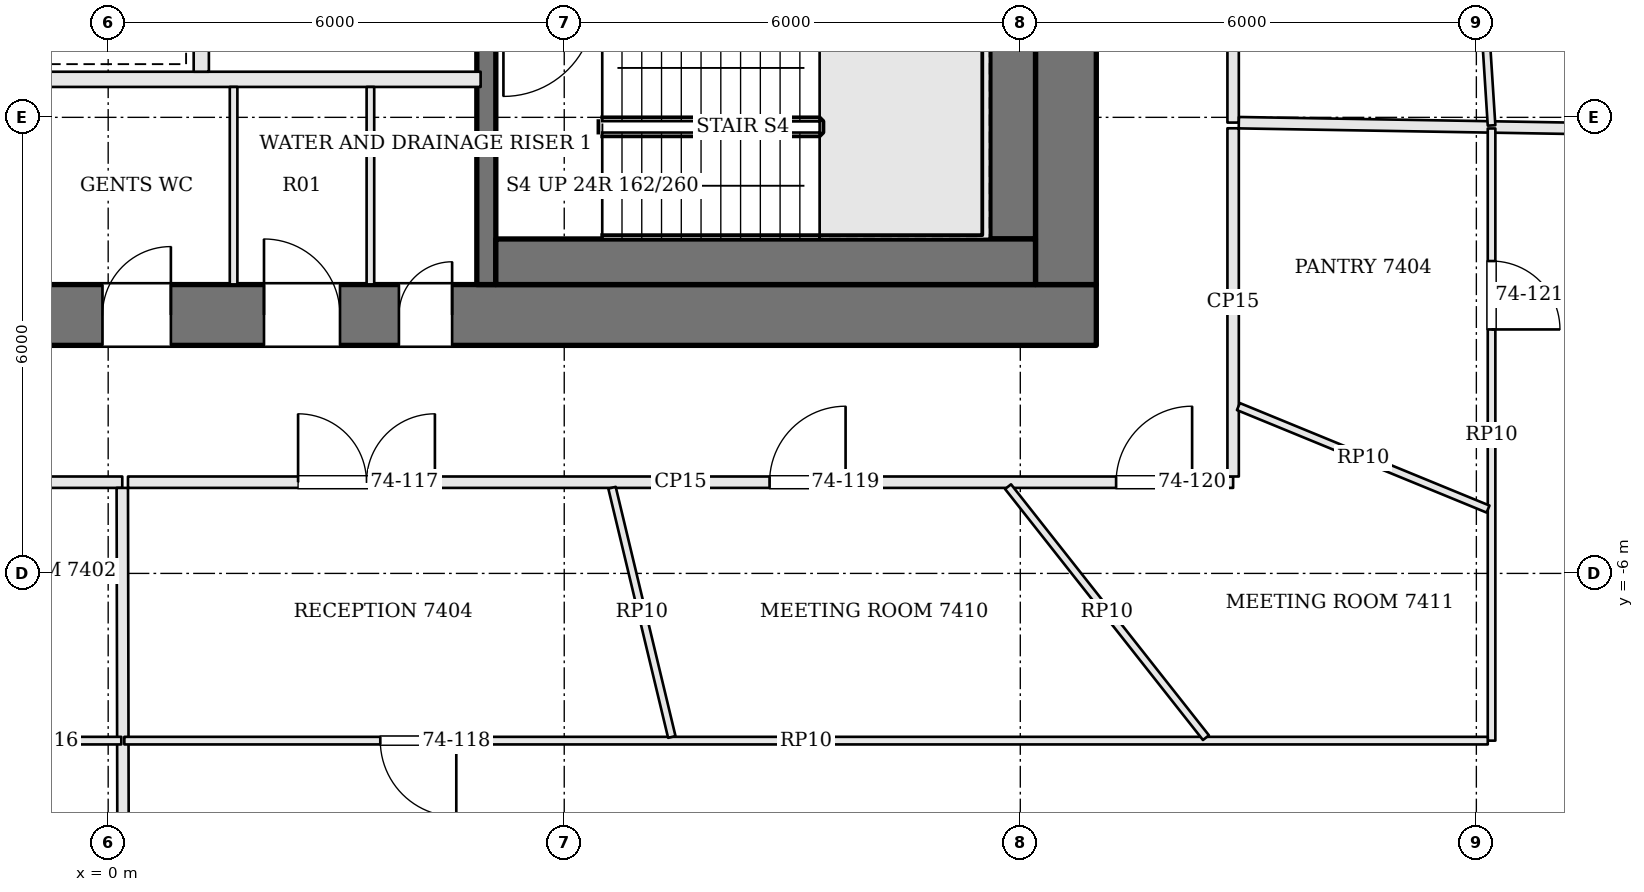
"""IFC4 building model, lengths in metres.
Left out: names, types, materials, properties, quantities, classifications, styles, units other than length and angle.
Written with IfcOpenShell. Run it as: python <this file> out.ifc"""

import sys

from ifc_helpers import new_model, si_unit, direction, frame, frame_2d, origin, place, context, subcontext, project, spatial, rectangle, extrude, element, fill, save


model = new_model("IFC4")
c1 = context("Model", 3, precision=1e-05, world=origin(), true_north=direction((0.0, 1.0)))
c2 = subcontext(c1, "Body", "Model", "MODEL_VIEW")
j1 = project(units=[si_unit("LENGTHUNIT", "METRE"), si_unit("PLANEANGLEUNIT", "RADIAN")], contexts=[c1])
p1 = place(None, origin())
s1 = spatial("IfcSite", under=j1, at=p1, CompositionType="ELEMENT")
p2 = place(p1, origin())
s2 = spatial("IfcBuilding", under=s1, at=p2, CompositionType="ELEMENT")
p3 = place(p2, frame((0.0, 0.0, 300.0)))
s3 = spatial("IfcBuildingStorey", under=s2, at=p3, CompositionType="ELEMENT", Elevation=300.0)
p4 = place(p3, frame((-13.0, -2.6, 0.0), z_axis=(0.0, 0.0, 1.0), x_axis=(1.0, 0.0, 0.0)))
e1 = element("IfcWall", 1, at=p4, inside=s3, PredefinedType="SHEAR", context=c2, shape_type="SweptSolid", body=[
    extrude(rectangle(XDim=26.0, YDim=0.8, at=frame_2d((13.0, 0.0))), origin(), (0.0, 0.0, 1.0), 3.9),
])
p5 = place(p4, frame((9.65, 0.0, 0.0)))
e2 = element("IfcOpeningElement", 2, at=p5, cuts=e1, PredefinedType="OPENING", context=c2, shape_type="SweptSolid", body=[
    extrude(rectangle(XDim=0.9, YDim=2.1, at=frame_2d((0.45, 1.05))), frame((0.0, 0.41, 0.0), z_axis=(0.0, -1.0, 0.0), x_axis=(1.0, 0.0, 0.0)), (0.0, 0.0, 1.0), 0.82),
])
p6 = place(p4, frame((12.925, 0.0, 0.0)))
e3 = element("IfcOpeningElement", 3, at=p6, cuts=e1, PredefinedType="OPENING", context=c2, shape_type="SweptSolid", body=[
    extrude(rectangle(XDim=0.9, YDim=2.1, at=frame_2d((0.45, 1.05))), frame((0.0, 0.41, 0.0), z_axis=(0.0, -1.0, 0.0), x_axis=(1.0, 0.0, 0.0)), (0.0, 0.0, 1.0), 0.82),
])
p7 = place(p4, frame((15.05, 0.0, 0.0)))
e4 = element("IfcOpeningElement", 4, at=p7, cuts=e1, PredefinedType="OPENING", context=c2, shape_type="SweptSolid", body=[
    extrude(rectangle(XDim=1.0, YDim=2.1, at=frame_2d((0.5, 1.05))), frame((0.0, 0.41, 0.0), z_axis=(0.0, -1.0, 0.0), x_axis=(1.0, 0.0, 0.0)), (0.0, 0.0, 1.0), 0.82),
])
p8 = place(p4, frame((16.825, 0.0, 0.0)))
e5 = element("IfcOpeningElement", 5, at=p8, cuts=e1, PredefinedType="OPENING", context=c2, shape_type="SweptSolid", body=[
    extrude(rectangle(XDim=0.7, YDim=2.1, at=frame_2d((0.35, 1.05))), frame((0.0, 0.41, 0.0), z_axis=(0.0, -1.0, 0.0), x_axis=(1.0, 0.0, 0.0)), (0.0, 0.0, 1.0), 0.82),
])
p9 = place(p3, frame((12.6, -2.2, 0.0), z_axis=(0.0, 0.0, 1.0), x_axis=(0.0, 1.0, 0.0)))
e6 = element("IfcWall", 6, at=p9, inside=s3, PredefinedType="SHEAR", context=c2, shape_type="SweptSolid", body=[
    extrude(rectangle(XDim=13.4, YDim=0.8, at=frame_2d((6.7, 0.0))), origin(), (0.0, 0.0, 1.0), 3.9),
])
p10 = place(p9, frame((7.4, 0.0, 0.0)))
e7 = element("IfcOpeningElement", 7, at=p10, cuts=e6, PredefinedType="OPENING", context=c2, shape_type="SweptSolid", body=[
    extrude(rectangle(XDim=1.8, YDim=2.1, at=frame_2d((0.9, 1.05))), frame((0.0, 0.41, 0.0), z_axis=(0.0, -1.0, 0.0), x_axis=(1.0, 0.0, 0.0)), (0.0, 0.0, 1.0), 0.82),
])
p11 = place(p3, frame((4.975, 11.2, 0.0), z_axis=(0.0, 0.0, 1.0), x_axis=(0.0, -1.0, 0.0)))
e8 = element("IfcWall", 8, at=p11, inside=s3, PredefinedType="SOLIDWALL", context=c2, shape_type="SweptSolid", body=[
    extrude(rectangle(XDim=13.4, YDim=0.25, at=frame_2d((6.7, 0.0))), origin(), (0.0, 0.0, 1.0), 3.7),
])
p12 = place(p11, frame((5.25, 0.0, 0.0)))
e9 = element("IfcOpeningElement", 9, at=p12, cuts=e8, PredefinedType="OPENING", context=c2, shape_type="SweptSolid", body=[
    extrude(rectangle(XDim=1.2, YDim=2.1, at=frame_2d((0.6, 1.05))), frame((0.0, 0.135, 0.0), z_axis=(0.0, -1.0, 0.0), x_axis=(1.0, 0.0, 0.0)), (0.0, 0.0, 1.0), 0.27),
])
p13 = place(p3, frame((11.9, 1.35, 0.0), z_axis=(0.0, 0.0, 1.0), x_axis=(0.0, -1.0, 0.0)))
e10 = element("IfcWall", 10, at=p13, inside=s3, PredefinedType="SOLIDWALL", context=c2, shape_type="SweptSolid", body=[
    extrude(rectangle(XDim=2.95, YDim=0.6, at=frame_2d((1.475, 0.0))), origin(), (0.0, 0.0, 1.0), 3.7),
])
p14 = place(p3, frame((12.2, -1.9, 0.0), z_axis=(0.0, 0.0, 1.0), x_axis=(-1.0, 0.0, 0.0)))
e11 = element("IfcWall", 11, at=p14, inside=s3, PredefinedType="SOLIDWALL", context=c2, shape_type="SweptSolid", body=[
    extrude(rectangle(XDim=7.1, YDim=0.6, at=frame_2d((3.55, 0.0))), origin(), (0.0, 0.0, 1.0), 3.7),
])
p15 = place(p3, frame((-4.9, 0.5, 0.0), z_axis=(0.0, 0.0, 1.0), x_axis=(1.0, 0.0, 0.0)))
e12 = element("IfcWall", 12, at=p15, inside=s3, PredefinedType="SOLIDWALL", context=c2, shape_type="SweptSolid", body=[
    extrude(rectangle(XDim=9.8, YDim=0.2, at=frame_2d((4.9, 0.0))), origin(), (0.0, 0.0, 1.0), 3.7),
])
p16 = place(p3, frame((1.225, 0.6, 0.0), z_axis=(0.0, 0.0, 1.0), x_axis=(0.0, 1.0, 0.0)))
e13 = element("IfcWall", 13, at=p16, inside=s3, PredefinedType="SOLIDWALL", context=c2, shape_type="SweptSolid", body=[
    extrude(rectangle(XDim=2.2, YDim=0.2, at=frame_2d((1.1, 0.0))), origin(), (0.0, 0.0, 1.0), 3.7),
])
for number, where, z_axis, x_axis in (
    (14, (1.65, -2.2, 0.0), (0.0, 0.0, 1.0), (0.0, 1.0, 0.0)),
    (15, (3.45, -2.2, 0.0), (0.0, 0.0, 1.0), (0.0, 1.0, 0.0)),
):
    element("IfcWall", number, at=place(p3, frame(where, z_axis=z_axis, x_axis=x_axis)), inside=s3, PredefinedType="PARTITIONING", context=c2, shape_type="SweptSolid", body=[
        extrude(rectangle(XDim=2.6, YDim=0.1, at=frame_2d((1.3, 0.0))), origin(), (0.0, 0.0, 1.0), 3.7),
    ])
p17 = place(p3, frame((14.8, -0.069, 0.0), z_axis=(0.0, 0.0, 1.0), x_axis=(0.0, 1.0, 0.0)))
e16 = element("IfcWall", 16, at=p17, inside=s3, PredefinedType="PARTITIONING", context=c2, shape_type="SweptSolid", body=[
    extrude(rectangle(XDim=13.869, YDim=0.15, at=frame_2d((6.935, 0.0))), origin(), (0.0, 0.0, 1.0), 3.198),
])
p18 = place(p17, frame((1.896, 0.0, 0.0)))
e17 = element("IfcOpeningElement", 17, at=p18, cuts=e16, PredefinedType="OPENING", context=c2, shape_type="SweptSolid", body=[
    extrude(rectangle(XDim=1.8, YDim=2.1, at=frame_2d((0.9, 1.05))), frame((0.0, 0.085, 0.0), z_axis=(0.0, -1.0, 0.0), x_axis=(1.0, 0.0, 0.0)), (0.0, 0.0, 1.0), 0.17),
])
p19 = place(p17, frame((6.355, 0.0, 0.0)))
e18 = element("IfcOpeningElement", 18, at=p19, cuts=e16, PredefinedType="OPENING", context=c2, shape_type="SweptSolid", body=[
    extrude(rectangle(XDim=1.0, YDim=2.4, at=frame_2d((0.5, 1.2))), frame((0.0, 0.085, 0.0), z_axis=(0.0, -1.0, 0.0), x_axis=(1.0, 0.0, 0.0)), (0.0, 0.0, 1.0), 0.17),
])
p20 = place(p17, frame((10.267, 0.0, 0.0)))
e19 = element("IfcOpeningElement", 19, at=p20, cuts=e16, PredefinedType="OPENING", context=c2, shape_type="SweptSolid", body=[
    extrude(rectangle(XDim=1.0, YDim=2.4, at=frame_2d((0.5, 1.2))), frame((0.0, 0.085, 0.0), z_axis=(0.0, -1.0, 0.0), x_axis=(1.0, 0.0, 0.0)), (0.0, 0.0, 1.0), 0.17),
])
p21 = place(p3, frame((24.384, -0.231, 0.0), z_axis=(0.0, 0.0, 1.0), x_axis=(-0.999857754758, 0.016866245889, 0.0)))
e20 = element("IfcWall", 20, at=p21, inside=s3, PredefinedType="PARTITIONING", context=c2, shape_type="SweptSolid", body=[
    extrude(rectangle(XDim=9.51, YDim=0.15, at=frame_2d((4.755, 0.0))), origin(), (0.0, 0.0, 1.0), 3.234),
])
p22 = place(p3, frame((-14.725, -4.8, 0.0), z_axis=(0.0, 0.0, 1.0), x_axis=(1.0, 0.0, 0.0)))
e21 = element("IfcWall", 21, at=p22, inside=s3, PredefinedType="PARTITIONING", context=c2, shape_type="SweptSolid", body=[
    extrude(rectangle(XDim=14.911, YDim=0.15, at=frame_2d((7.455, 0.0))), origin(), (0.0, 0.0, 1.0), 3.198),
])
p23 = place(p22, frame((0.525, 0.0, 0.0)))
e22 = element("IfcOpeningElement", 22, at=p23, cuts=e21, PredefinedType="OPENING", context=c2, shape_type="SweptSolid", body=[
    extrude(rectangle(XDim=1.0, YDim=2.4, at=frame_2d((0.5, 1.2))), frame((0.0, 0.085, 0.0), z_axis=(0.0, -1.0, 0.0), x_axis=(1.0, 0.0, 0.0)), (0.0, 0.0, 1.0), 0.17),
])
p24 = place(p22, frame((4.179, 0.0, 0.0)))
e23 = element("IfcOpeningElement", 23, at=p24, cuts=e21, PredefinedType="OPENING", context=c2, shape_type="SweptSolid", body=[
    extrude(rectangle(XDim=1.0, YDim=2.4, at=frame_2d((0.5, 1.2))), frame((0.0, 0.085, 0.0), z_axis=(0.0, -1.0, 0.0), x_axis=(1.0, 0.0, 0.0)), (0.0, 0.0, 1.0), 0.17),
])
p25 = place(p22, frame((6.794, 0.0, 0.0)))
e24 = element("IfcOpeningElement", 24, at=p25, cuts=e21, PredefinedType="OPENING", context=c2, shape_type="SweptSolid", body=[
    extrude(rectangle(XDim=0.7, YDim=2.1, at=frame_2d((0.35, 1.05))), frame((0.0, 0.085, 0.0), z_axis=(0.0, -1.0, 0.0), x_axis=(1.0, 0.0, 0.0)), (0.0, 0.0, 1.0), 0.17),
])
p26 = place(p3, frame((0.213, -17.994, 0.0), z_axis=(0.0, 0.0, 1.0), x_axis=(-0.002102907791, 0.999997788887, 0.0)))
e25 = element("IfcWall", 25, at=p26, inside=s3, PredefinedType="PARTITIONING", context=c2, shape_type="SweptSolid", body=[
    extrude(rectangle(XDim=13.119, YDim=0.15, at=frame_2d((6.56, 0.0))), origin(), (0.0, 0.0, 1.0), 3.234),
])
p27 = place(p3, frame((0.26, -4.8, 0.0), z_axis=(0.0, 0.0, 1.0), x_axis=(1.0, 0.0, 0.0)))
e26 = element("IfcWall", 26, at=p27, inside=s3, PredefinedType="PARTITIONING", context=c2, shape_type="SweptSolid", body=[
    extrude(rectangle(XDim=14.54, YDim=0.15, at=frame_2d((7.27, 0.0))), origin(), (0.0, 0.0, 1.0), 3.198),
])
p28 = place(p27, frame((2.238, 0.0, 0.0)))
e27 = element("IfcOpeningElement", 27, at=p28, cuts=e26, PredefinedType="OPENING", context=c2, shape_type="SweptSolid", body=[
    extrude(rectangle(XDim=1.8, YDim=2.1, at=frame_2d((0.9, 1.05))), frame((0.0, 0.085, 0.0), z_axis=(0.0, -1.0, 0.0), x_axis=(1.0, 0.0, 0.0)), (0.0, 0.0, 1.0), 0.17),
])
p29 = place(p27, frame((8.441, 0.0, 0.0)))
e28 = element("IfcOpeningElement", 28, at=p29, cuts=e26, PredefinedType="OPENING", context=c2, shape_type="SweptSolid", body=[
    extrude(rectangle(XDim=1.0, YDim=2.4, at=frame_2d((0.5, 1.2))), frame((0.0, 0.085, 0.0), z_axis=(0.0, -1.0, 0.0), x_axis=(1.0, 0.0, 0.0)), (0.0, 0.0, 1.0), 0.17),
])
p30 = place(p27, frame((13.0, 0.0, 0.0)))
e29 = element("IfcOpeningElement", 29, at=p30, cuts=e26, PredefinedType="OPENING", context=c2, shape_type="SweptSolid", body=[
    extrude(rectangle(XDim=1.0, YDim=2.4, at=frame_2d((0.5, 1.2))), frame((0.0, 0.085, 0.0), z_axis=(0.0, -1.0, 0.0), x_axis=(1.0, 0.0, 0.0)), (0.0, 0.0, 1.0), 0.17),
])
p31 = place(p3, frame((14.8, -4.725, 0.0), z_axis=(0.0, 0.0, 1.0), x_axis=(0.0, 1.0, 0.0)))
e30 = element("IfcWall", 30, at=p31, inside=s3, PredefinedType="PARTITIONING", context=c2, shape_type="SweptSolid", body=[
    extrude(rectangle(XDim=4.581, YDim=0.15, at=frame_2d((2.291, 0.0))), origin(), (0.0, 0.0, 1.0), 3.198),
])
p32 = place(p3, frame((17.447, 11.654, 0.0), z_axis=(0.0, 0.0, 1.0), x_axis=(0.063870484703, -0.99795819611, 0.0)))
e31 = element("IfcWall", 31, at=p32, inside=s3, PredefinedType="PARTITIONING", context=c2, shape_type="SweptSolid", body=[
    extrude(rectangle(XDim=11.785, YDim=0.1, at=frame_2d((5.892, 0.0))), origin(), (0.0, 0.0, 1.0), 3.184),
])
p33 = place(p32, frame((8.147, 0.0, 0.0)))
e32 = element("IfcOpeningElement", 32, at=p33, cuts=e31, PredefinedType="OPENING", context=c2, shape_type="SweptSolid", body=[
    extrude(rectangle(XDim=1.0, YDim=2.1, at=frame_2d((0.5, 1.05))), frame((0.0, 0.06, 0.0), z_axis=(0.0, -1.0, 0.0), x_axis=(1.0, 0.0, 0.0)), (0.0, 0.0, 1.0), 0.12),
])
p34 = place(p3, frame((0.173, -8.2, 0.0), z_axis=(0.0, 0.0, 1.0), x_axis=(-1.0, 0.0, 0.0)))
e33 = element("IfcWall", 33, at=p34, inside=s3, PredefinedType="PARTITIONING", context=c2, shape_type="SweptSolid", body=[
    extrude(rectangle(XDim=18.323, YDim=0.1, at=frame_2d((9.161, 0.0))), origin(), (0.0, 0.0, 1.0), 3.184),
])
p35 = place(p34, frame((5.325, 0.0, 0.0)))
e34 = element("IfcOpeningElement", 34, at=p35, cuts=e33, PredefinedType="OPENING", context=c2, shape_type="SweptSolid", body=[
    extrude(rectangle(XDim=0.9, YDim=2.1, at=frame_2d((0.45, 1.05))), frame((0.0, 0.06, 0.0), z_axis=(0.0, -1.0, 0.0), x_axis=(1.0, 0.0, 0.0)), (0.0, 0.0, 1.0), 0.12),
])
p36 = place(p34, frame((1.061, 0.0, 0.0)))
e35 = element("IfcOpeningElement", 35, at=p36, cuts=e33, PredefinedType="OPENING", context=c2, shape_type="SweptSolid", body=[
    extrude(rectangle(XDim=0.9, YDim=2.1, at=frame_2d((0.45, 1.05))), frame((0.0, 0.06, 0.0), z_axis=(0.0, -1.0, 0.0), x_axis=(1.0, 0.0, 0.0)), (0.0, 0.0, 1.0), 0.12),
])
p37 = place(p3, frame((18.2, -0.146, 0.0), z_axis=(0.0, 0.0, 1.0), x_axis=(0.0, -1.0, 0.0)))
e36 = element("IfcWall", 36, at=p37, inside=s3, PredefinedType="PARTITIONING", context=c2, shape_type="SweptSolid", body=[
    extrude(rectangle(XDim=8.054, YDim=0.1, at=frame_2d((4.027, 0.0))), origin(), (0.0, 0.0, 1.0), 3.184),
])
p38 = place(p37, frame((1.744, 0.0, 0.0)))
e37 = element("IfcOpeningElement", 37, at=p38, cuts=e36, PredefinedType="OPENING", context=c2, shape_type="SweptSolid", body=[
    extrude(rectangle(XDim=0.9, YDim=2.1, at=frame_2d((0.45, 1.05))), frame((0.0, 0.06, 0.0), z_axis=(0.0, -1.0, 0.0), x_axis=(1.0, 0.0, 0.0)), (0.0, 0.0, 1.0), 0.12),
])
p39 = place(p3, frame((18.15, -8.2, 0.0), z_axis=(0.0, 0.0, 1.0), x_axis=(-1.0, 0.0, 0.0)))
e38 = element("IfcWall", 38, at=p39, inside=s3, PredefinedType="PARTITIONING", context=c2, shape_type="SweptSolid", body=[
    extrude(rectangle(XDim=17.937, YDim=0.1, at=frame_2d((8.969, 0.0))), origin(), (0.0, 0.0, 1.0), 3.184),
])
p40 = place(p39, frame((13.57, 0.0, 0.0)))
e39 = element("IfcOpeningElement", 39, at=p40, cuts=e38, PredefinedType="OPENING", context=c2, shape_type="SweptSolid", body=[
    extrude(rectangle(XDim=1.0, YDim=2.1, at=frame_2d((0.5, 1.05))), frame((0.0, 0.06, 0.0), z_axis=(0.0, -1.0, 0.0), x_axis=(1.0, 0.0, 0.0)), (0.0, 0.0, 1.0), 0.12),
])
p41 = place(p3, frame((6.629, -4.873, 0.0), z_axis=(0.0, 0.0, 1.0), x_axis=(0.233307223636, -0.972403074553, 0.0)))
e40 = element("IfcWall", 40, at=p41, inside=s3, PredefinedType="PARTITIONING", context=c2, shape_type="SweptSolid", body=[
    extrude(rectangle(XDim=3.372, YDim=0.1, at=frame_2d((1.686, 0.0))), origin(), (0.0, 0.0, 1.0), 3.184),
])
p42 = place(p3, frame((11.839, -4.859, 0.0), z_axis=(0.0, 0.0, 1.0), x_axis=(0.619149025844, -0.78527350891, 0.0)))
e41 = element("IfcWall", 41, at=p42, inside=s3, PredefinedType="PARTITIONING", context=c2, shape_type="SweptSolid", body=[
    extrude(rectangle(XDim=4.205, YDim=0.1, at=frame_2d((2.102, 0.0))), origin(), (0.0, 0.0, 1.0), 3.184),
])
p43 = place(p3, frame((14.869, -3.805, 0.0), z_axis=(0.0, 0.0, 1.0), x_axis=(0.925100495969, -0.379722362205, 0.0)))
e42 = element("IfcWall", 42, at=p43, inside=s3, PredefinedType="PARTITIONING", context=c2, shape_type="SweptSolid", body=[
    extrude(rectangle(XDim=3.55, YDim=0.1, at=frame_2d((1.775, 0.0))), origin(), (0.0, 0.0, 1.0), 3.184),
])
p44 = place(p6, origin())
e43 = element("IfcDoor", 43, at=p44, inside=s3, OperationType="SINGLE_SWING_RIGHT", PredefinedType="DOOR", context=c2, shape_type="SweptSolid", body=[
    extrude(rectangle(XDim=0.9, YDim=2.1, at=frame_2d((0.45, 1.05))), frame((0.0, 0.025, 0.0), z_axis=(0.0, -1.0, 0.0), x_axis=(1.0, 0.0, 0.0)), (0.0, 0.0, 1.0), 0.05),
])
fill(e3, e43)
p45 = place(p7, origin())
e44 = element("IfcDoor", 44, at=p45, inside=s3, OperationType="SINGLE_SWING_LEFT", PredefinedType="DOOR", context=c2, shape_type="SweptSolid", body=[
    extrude(rectangle(XDim=1.0, YDim=2.1, at=frame_2d((0.5, 1.05))), frame((0.0, 0.025, 0.0), z_axis=(0.0, -1.0, 0.0), x_axis=(1.0, 0.0, 0.0)), (0.0, 0.0, 1.0), 0.05),
])
fill(e4, e44)
p46 = place(p8, origin())
e45 = element("IfcDoor", 45, at=p46, inside=s3, OperationType="SINGLE_SWING_RIGHT", PredefinedType="DOOR", context=c2, shape_type="SweptSolid", body=[
    extrude(rectangle(XDim=0.7, YDim=2.1, at=frame_2d((0.35, 1.05))), frame((0.0, 0.025, 0.0), z_axis=(0.0, -1.0, 0.0), x_axis=(1.0, 0.0, 0.0)), (0.0, 0.0, 1.0), 0.05),
])
fill(e5, e45)
p47 = place(p28, origin())
e46 = element("IfcDoor", 46, at=p47, inside=s3, OperationType="DOUBLE_DOOR_SINGLE_SWING", PredefinedType="DOOR", context=c2, shape_type="SweptSolid", body=[
    extrude(rectangle(XDim=1.8, YDim=2.1, at=frame_2d((0.9, 1.05))), frame((0.0, 0.025, 0.0), z_axis=(0.0, -1.0, 0.0), x_axis=(1.0, 0.0, 0.0)), (0.0, 0.0, 1.0), 0.05),
])
fill(e27, e46)
p48 = place(p40, origin())
e47 = element("IfcDoor", 47, at=p48, inside=s3, OperationType="SINGLE_SWING_LEFT", PredefinedType="DOOR", context=c2, shape_type="SweptSolid", body=[
    extrude(rectangle(XDim=1.0, YDim=2.1, at=frame_2d((0.5, 1.05))), frame((0.0, 0.025, 0.0), z_axis=(0.0, -1.0, 0.0), x_axis=(1.0, 0.0, 0.0)), (0.0, 0.0, 1.0), 0.05),
])
fill(e39, e47)
p49 = place(p29, origin())
e48 = element("IfcDoor", 48, at=p49, inside=s3, OperationType="SINGLE_SWING_RIGHT", PredefinedType="DOOR", context=c2, shape_type="SweptSolid", body=[
    extrude(rectangle(XDim=1.0, YDim=2.4, at=frame_2d((0.5, 1.2))), frame((0.0, 0.025, 0.0), z_axis=(0.0, -1.0, 0.0), x_axis=(1.0, 0.0, 0.0)), (0.0, 0.0, 1.0), 0.05),
])
fill(e28, e48)
p50 = place(p30, origin())
e49 = element("IfcDoor", 49, at=p50, inside=s3, OperationType="SINGLE_SWING_RIGHT", PredefinedType="DOOR", context=c2, shape_type="SweptSolid", body=[
    extrude(rectangle(XDim=1.0, YDim=2.4, at=frame_2d((0.5, 1.2))), frame((0.0, 0.025, 0.0), z_axis=(0.0, -1.0, 0.0), x_axis=(1.0, 0.0, 0.0)), (0.0, 0.0, 1.0), 0.05),
])
fill(e29, e49)
p51 = place(p38, origin())
e50 = element("IfcDoor", 50, at=p51, inside=s3, OperationType="SINGLE_SWING_RIGHT", PredefinedType="DOOR", context=c2, shape_type="SweptSolid", body=[
    extrude(rectangle(XDim=0.9, YDim=2.1, at=frame_2d((0.45, 1.05))), frame((0.0, 0.025, 0.0), z_axis=(0.0, -1.0, 0.0), x_axis=(1.0, 0.0, 0.0)), (0.0, 0.0, 1.0), 0.05),
])
fill(e37, e50)
save(model, sys.argv[1])
